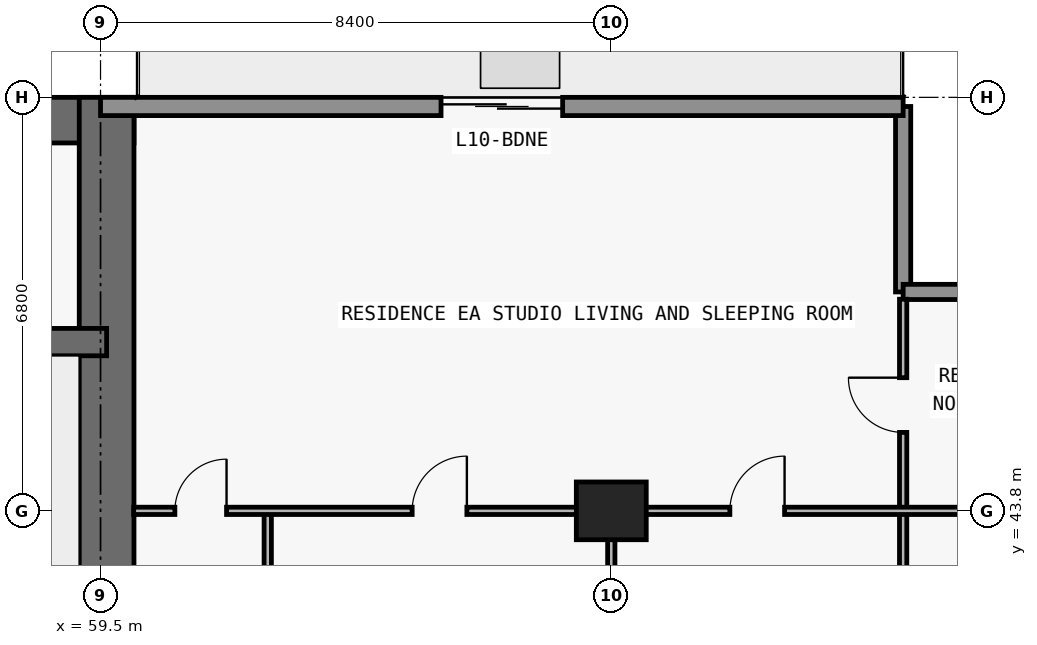
"""IFC4 building model, lengths in metres.
Left out: names, types, materials, properties, quantities, classifications, styles, units other than length and angle.
Written with IfcOpenShell. Run it as: python <this file> out.ifc"""

import sys

from ifc_helpers import new_model, si_unit, direction, frame, frame_2d, origin, origin_2d, place, context, subcontext, project, spatial, rectangle, extrude, element, fill, save


model = new_model("IFC4")
c1 = context("Model", 3, precision=1e-05, world=origin(), true_north=direction((0.0, 1.0)))
c2 = subcontext(c1, "Body", "Model", "MODEL_VIEW")
j1 = project(units=[si_unit("LENGTHUNIT", "METRE"), si_unit("PLANEANGLEUNIT", "RADIAN")], contexts=[c1])
p1 = place(None, origin())
s1 = spatial("IfcSite", under=j1, at=p1, CompositionType="ELEMENT")
p2 = place(p1, origin())
s2 = spatial("IfcBuilding", under=s1, at=p2, CompositionType="ELEMENT")
p3 = place(p2, frame((0.0, 0.0, 43.2)))
s3 = spatial("IfcBuildingStorey", under=s2, at=p3, CompositionType="ELEMENT", Elevation=43.2)
p4 = place(p3, frame((67.9, 43.8, 0.0), z_axis=(0.0, 0.0, 1.0), x_axis=(1.0, 0.0, 0.0)))
e1 = element("IfcColumn", 1, at=p4, inside=s3, PredefinedType="COLUMN", context=c2, shape_type="SweptSolid", body=[
    extrude(rectangle(XDim=1.15, YDim=0.95, at=origin_2d()), origin(), (0.0, 0.0, 1.0), 3.05),
])
p5 = place(p3, frame((17.75, 50.225, 0.0), z_axis=(0.0, 0.0, 1.0), x_axis=(1.0, 0.0, 0.0)))
e2 = element("IfcWall", 2, at=p5, inside=s3, PredefinedType="SHEAR", context=c2, shape_type="SweptSolid", body=[
    extrude(rectangle(XDim=42.3, YDim=0.75, at=frame_2d((21.15, 0.0))), origin(), (0.0, 0.0, 1.0), 3.05),
])
p6 = place(p3, frame((59.6, 36.45, 0.0), z_axis=(0.0, 0.0, 1.0), x_axis=(0.0, 1.0, 0.0)))
e3 = element("IfcWall", 3, at=p6, inside=s3, PredefinedType="SHEAR", context=c2, shape_type="SweptSolid", body=[
    extrude(rectangle(XDim=14.15, YDim=0.9, at=frame_2d((7.075, 0.0))), origin(), (0.0, 0.0, 1.0), 3.05),
])
p7 = place(p3, frame((18.2, 46.575, 0.0), z_axis=(0.0, 0.0, 1.0), x_axis=(1.0, 0.0, 0.0)))
e4 = element("IfcWall", 4, at=p7, inside=s3, PredefinedType="SHEAR", context=c2, shape_type="SweptSolid", body=[
    extrude(rectangle(XDim=41.4, YDim=0.45, at=frame_2d((20.7, 0.0))), origin(), (0.0, 0.0, 1.0), 3.05),
])
p8 = place(p7, frame((7.675, 0.0, 0.0)))
e5 = element("IfcOpeningElement", 5, at=p8, cuts=e4, PredefinedType="OPENING", context=c2, shape_type="SweptSolid", body=[
    extrude(rectangle(XDim=1.05, YDim=2.15, at=frame_2d((0.525, 1.075))), frame((0.0, 0.235, 0.0), z_axis=(0.0, -1.0, 0.0), x_axis=(1.0, 0.0, 0.0)), (0.0, 0.0, 1.0), 0.47),
])
p9 = place(p7, frame((32.725, 0.0, 0.0)))
e6 = element("IfcOpeningElement", 6, at=p9, cuts=e4, PredefinedType="OPENING", context=c2, shape_type="SweptSolid", body=[
    extrude(rectangle(XDim=1.05, YDim=2.15, at=frame_2d((0.525, 1.075))), frame((0.0, 0.235, 0.0), z_axis=(0.0, -1.0, 0.0), x_axis=(1.0, 0.0, 0.0)), (0.0, 0.0, 1.0), 0.47),
])
p10 = place(p3, frame((72.7, 50.45, 0.0), z_axis=(0.0, 0.0, 1.0), x_axis=(0.0, -1.0, 0.0)))
e7 = element("IfcWall", 7, at=p10, inside=s3, PredefinedType="ELEMENTEDWALL", context=c2, shape_type="SweptSolid", body=[
    extrude(rectangle(XDim=3.05, YDim=0.25, at=frame_2d((1.525, 0.0))), origin(), (0.0, 0.0, 1.0), 3.05),
])
p11 = place(p3, frame((72.7, 47.4, 0.0), z_axis=(0.0, 0.0, 1.0), x_axis=(1.0, 0.0, 0.0)))
e8 = element("IfcWall", 8, at=p11, inside=s3, PredefinedType="ELEMENTEDWALL", context=c2, shape_type="SweptSolid", body=[
    extrude(rectangle(XDim=3.45, YDim=0.25, at=frame_2d((1.725, 0.0))), origin(), (0.0, 0.0, 1.0), 3.05),
])
p12 = place(p3, frame((59.5, 50.45, 0.0), z_axis=(0.0, 0.0, 1.0), x_axis=(1.0, 0.0, 0.0)))
e9 = element("IfcWall", 9, at=p12, inside=s3, PredefinedType="STANDARD", context=c2, shape_type="SweptSolid", body=[
    extrude(rectangle(XDim=13.2, YDim=0.3, at=frame_2d((6.6, 0.0))), origin(), (0.0, 0.0, 1.0), 3.05),
])
p13 = place(p12, frame((5.6, 0.0, 0.0)))
e10 = element("IfcOpeningElement", 10, at=p13, cuts=e9, PredefinedType="OPENING", context=c2, shape_type="SweptSolid", body=[
    extrude(rectangle(XDim=2.0, YDim=2.3, at=frame_2d((1.0, 1.15))), frame((0.0, 0.16, 0.0), z_axis=(0.0, -1.0, 0.0), x_axis=(1.0, 0.0, 0.0)), (0.0, 0.0, 1.0), 0.32),
])
p14 = place(p3, frame((62.25, 36.9, 0.0), z_axis=(0.0, 0.0, 1.0), x_axis=(0.0, 1.0, 0.0)))
e11 = element("IfcWall", 11, at=p14, inside=s3, PredefinedType="PARTITIONING", context=c2, shape_type="SweptSolid", body=[
    extrude(rectangle(XDim=6.9, YDim=0.12, at=frame_2d((3.45, 0.0))), origin(), (0.0, 0.0, 1.0), 3.05),
])
p15 = place(p14, frame((1.231, 0.0, 0.0)))
e12 = element("IfcOpeningElement", 12, at=p15, cuts=e11, PredefinedType="OPENING", context=c2, shape_type="SweptSolid", body=[
    extrude(rectangle(XDim=0.85, YDim=2.1, at=frame_2d((0.425, 1.05))), frame((0.0, 0.07, 0.0), z_axis=(0.0, -1.0, 0.0), x_axis=(1.0, 0.0, 0.0)), (0.0, 0.0, 1.0), 0.14),
])
p16 = place(p3, frame((67.9, 36.9, 0.0), z_axis=(0.0, 0.0, 1.0), x_axis=(0.0, 1.0, 0.0)))
e13 = element("IfcWall", 13, at=p16, inside=s3, PredefinedType="PARTITIONING", context=c2, shape_type="SweptSolid", body=[
    extrude(rectangle(XDim=6.9, YDim=0.12, at=frame_2d((3.45, 0.0))), origin(), (0.0, 0.0, 1.0), 2.11),
])
p17 = place(p3, frame((72.7, 36.905, 0.0), z_axis=(0.0, 0.0, 1.0), x_axis=(0.0, 1.0, 0.0)))
e14 = element("IfcWall", 14, at=p17, inside=s3, PredefinedType="PARTITIONING", context=c2, shape_type="SweptSolid", body=[
    extrude(rectangle(XDim=10.375, YDim=0.12, at=frame_2d((5.188, 0.0))), origin(), (0.0, 0.0, 1.0), 3.05),
])
p18 = place(p17, frame((2.998, 0.0, 0.0)))
e15 = element("IfcOpeningElement", 15, at=p18, cuts=e14, PredefinedType="OPENING", context=c2, shape_type="SweptSolid", body=[
    extrude(rectangle(XDim=0.9, YDim=2.15, at=frame_2d((0.45, 1.075))), frame((0.0, 0.07, 0.0), z_axis=(0.0, -1.0, 0.0), x_axis=(1.0, 0.0, 0.0)), (0.0, 0.0, 1.0), 0.14),
])
p19 = place(p17, frame((8.185, 0.0, 0.0)))
e16 = element("IfcOpeningElement", 16, at=p19, cuts=e14, PredefinedType="OPENING", context=c2, shape_type="SweptSolid", body=[
    extrude(rectangle(XDim=0.9, YDim=2.15, at=frame_2d((0.45, 1.075))), frame((0.0, 0.07, 0.0), z_axis=(0.0, -1.0, 0.0), x_axis=(1.0, 0.0, 0.0)), (0.0, 0.0, 1.0), 0.14),
])
p20 = place(p3, frame((60.045, 43.8, 0.0), z_axis=(0.0, 0.0, 1.0), x_axis=(1.0, 0.0, 0.0)))
e17 = element("IfcWall", 17, at=p20, inside=s3, PredefinedType="PARTITIONING", context=c2, shape_type="SweptSolid", body=[
    extrude(rectangle(XDim=15.96, YDim=0.12, at=frame_2d((7.98, 0.0))), origin(), (0.0, 0.0, 1.0), 2.339),
])
p21 = place(p20, frame((9.805, 0.0, 0.0)))
e18 = element("IfcOpeningElement", 18, at=p21, cuts=e17, PredefinedType="OPENING", context=c2, shape_type="SweptSolid", body=[
    extrude(rectangle(XDim=0.9, YDim=2.15, at=frame_2d((0.45, 1.075))), frame((0.0, 0.07, 0.0), z_axis=(0.0, -1.0, 0.0), x_axis=(1.0, 0.0, 0.0)), (0.0, 0.0, 1.0), 0.14),
])
p22 = place(p20, frame((4.58, 0.0, 0.0)))
e19 = element("IfcOpeningElement", 19, at=p22, cuts=e17, PredefinedType="OPENING", context=c2, shape_type="SweptSolid", body=[
    extrude(rectangle(XDim=0.9, YDim=2.15, at=frame_2d((0.45, 1.075))), frame((0.0, 0.07, 0.0), z_axis=(0.0, -1.0, 0.0), x_axis=(1.0, 0.0, 0.0)), (0.0, 0.0, 1.0), 0.14),
])
p23 = place(p20, frame((0.677, 0.0, 0.0)))
e20 = element("IfcOpeningElement", 20, at=p23, cuts=e17, PredefinedType="OPENING", context=c2, shape_type="SweptSolid", body=[
    extrude(rectangle(XDim=0.85, YDim=2.1, at=frame_2d((0.425, 1.05))), frame((0.0, 0.07, 0.0), z_axis=(0.0, -1.0, 0.0), x_axis=(1.0, 0.0, 0.0)), (0.0, 0.0, 1.0), 0.14),
])
p24 = place(p13, origin())
e21 = element("IfcDoor", 21, at=p24, inside=s3, OperationType="DOUBLE_DOOR_SLIDING", PredefinedType="DOOR", context=c2, shape_type="SweptSolid", body=[
    extrude(rectangle(XDim=2.0, YDim=2.3, at=frame_2d((1.0, 1.15))), frame((0.0, 0.025, 0.0), z_axis=(0.0, -1.0, 0.0), x_axis=(1.0, 0.0, 0.0)), (0.0, 0.0, 1.0), 0.05),
])
fill(e10, e21)
p25 = place(p21, origin())
e22 = element("IfcDoor", 22, at=p25, inside=s3, OperationType="SINGLE_SWING_RIGHT", PredefinedType="DOOR", context=c2, shape_type="SweptSolid", body=[
    extrude(rectangle(XDim=0.9, YDim=2.15, at=frame_2d((0.45, 1.075))), frame((0.0, 0.025, 0.0), z_axis=(0.0, -1.0, 0.0), x_axis=(1.0, 0.0, 0.0)), (0.0, 0.0, 1.0), 0.05),
])
fill(e18, e22)
p26 = place(p22, origin())
e23 = element("IfcDoor", 23, at=p26, inside=s3, OperationType="SINGLE_SWING_RIGHT", PredefinedType="DOOR", context=c2, shape_type="SweptSolid", body=[
    extrude(rectangle(XDim=0.9, YDim=2.15, at=frame_2d((0.45, 1.075))), frame((0.0, 0.025, 0.0), z_axis=(0.0, -1.0, 0.0), x_axis=(1.0, 0.0, 0.0)), (0.0, 0.0, 1.0), 0.05),
])
fill(e19, e23)
p27 = place(p23, origin())
e24 = element("IfcDoor", 24, at=p27, inside=s3, OperationType="SINGLE_SWING_RIGHT", PredefinedType="DOOR", context=c2, shape_type="SweptSolid", body=[
    extrude(rectangle(XDim=0.85, YDim=2.1, at=frame_2d((0.425, 1.05))), frame((0.0, 0.025, 0.0), z_axis=(0.0, -1.0, 0.0), x_axis=(1.0, 0.0, 0.0)), (0.0, 0.0, 1.0), 0.05),
])
fill(e20, e24)
p28 = place(p19, origin())
e25 = element("IfcDoor", 25, at=p28, inside=s3, OperationType="SINGLE_SWING_RIGHT", PredefinedType="DOOR", context=c2, shape_type="SweptSolid", body=[
    extrude(rectangle(XDim=0.9, YDim=2.15, at=frame_2d((0.45, 1.075))), frame((0.0, 0.025, 0.0), z_axis=(0.0, -1.0, 0.0), x_axis=(1.0, 0.0, 0.0)), (0.0, 0.0, 1.0), 0.05),
])
fill(e16, e25)
save(model, sys.argv[1])
